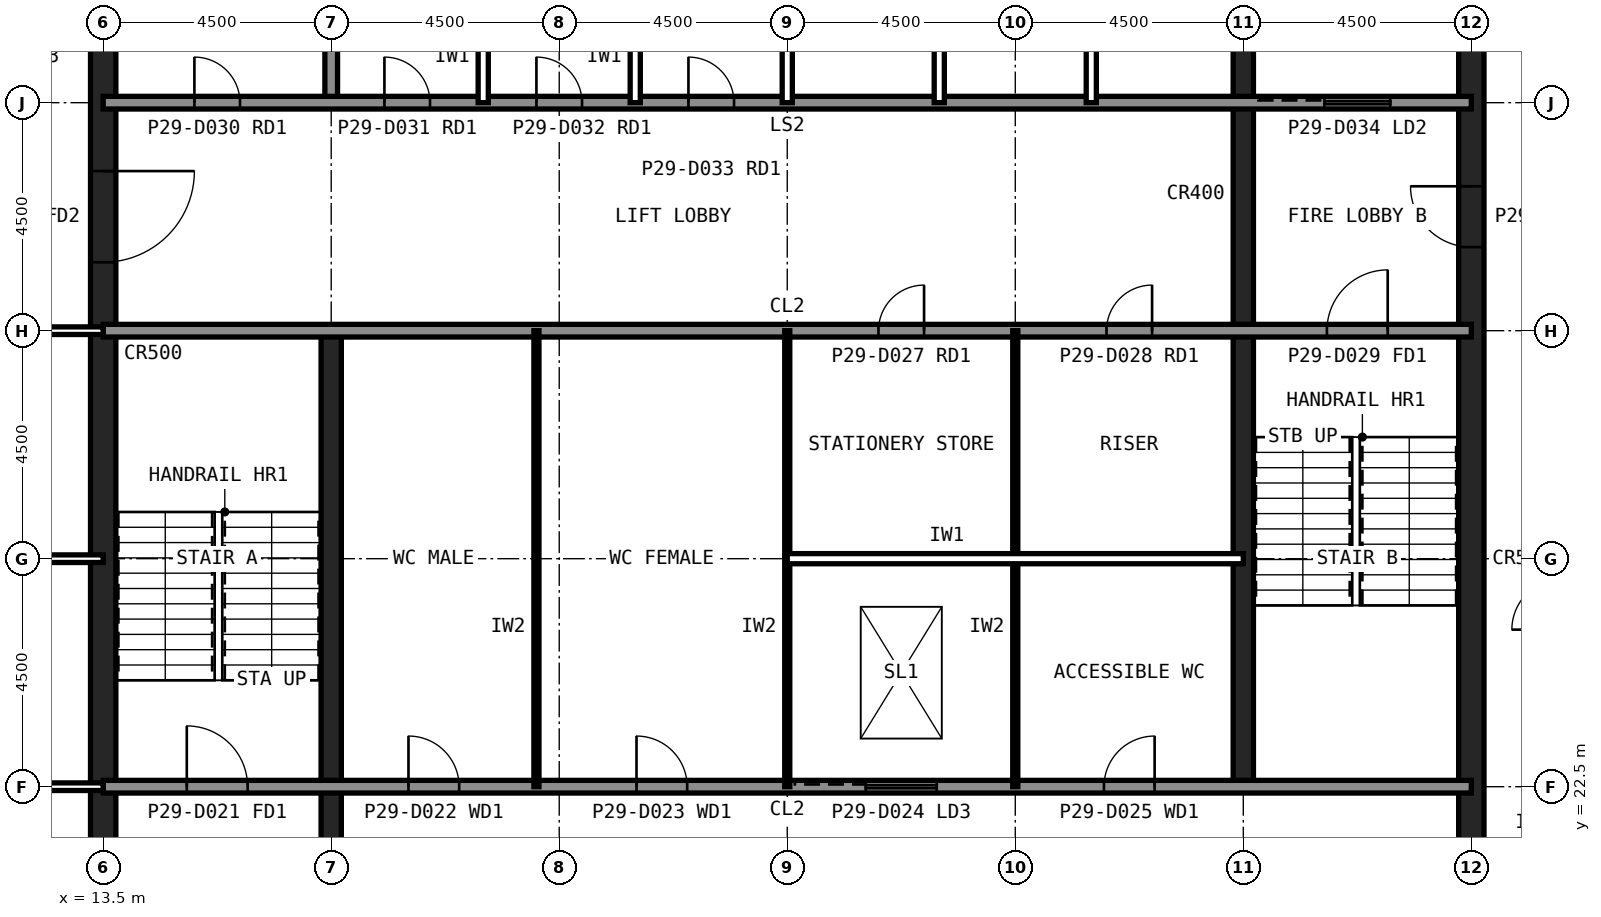
"""IFC4 building model, lengths in metres.
Left out: names, types, materials, properties, quantities, classifications, styles, units other than length and angle.
Written with IfcOpenShell. Run it as: python <this file> out.ifc"""

import sys

from ifc_helpers import new_model, si_unit, direction, frame, frame_2d, origin, place, context, subcontext, project, spatial, rectangle, extrude, element, fill, save


model = new_model("IFC4")
c1 = context("Model", 3, precision=1e-05, world=origin(), true_north=direction((0.0, 1.0)))
c2 = subcontext(c1, "Body", "Model", "MODEL_VIEW")
j1 = project(units=[si_unit("LENGTHUNIT", "METRE"), si_unit("PLANEANGLEUNIT", "RADIAN")], contexts=[c1])
p1 = place(None, origin())
s1 = spatial("IfcSite", under=j1, at=p1, CompositionType="ELEMENT")
p2 = place(p1, origin())
s2 = spatial("IfcBuilding", under=s1, at=p2, CompositionType="ELEMENT")
p3 = place(p2, frame((0.0, 0.0, 127.6)))
s3 = spatial("IfcBuildingStorey", under=s2, at=p3, CompositionType="ELEMENT", Elevation=127.6)
p4 = place(p3, frame((40.5, 13.5, 0.0), z_axis=(0.0, 0.0, 1.0), x_axis=(0.0, 1.0, 0.0)))
e1 = element("IfcWall", 1, at=p4, inside=s3, PredefinedType="SHEAR", context=c2, shape_type="SweptSolid", body=[
    extrude(rectangle(XDim=27.0, YDim=0.5, at=frame_2d((13.5, 0.0))), origin(), (0.0, 0.0, 1.0), 4.0),
])
p5 = place(p4, frame((5.85, 0.0, 0.0)))
e2 = element("IfcOpeningElement", 2, at=p5, cuts=e1, PredefinedType="OPENING", context=c2, shape_type="SweptSolid", body=[
    extrude(rectangle(XDim=1.8, YDim=2.1, at=frame_2d((0.9, 1.05))), frame((0.0, 0.26, 0.0), z_axis=(0.0, -1.0, 0.0), x_axis=(1.0, 0.0, 0.0)), (0.0, 0.0, 1.0), 0.52),
])
p6 = place(p4, frame((19.65, 0.0, 0.0)))
e3 = element("IfcOpeningElement", 3, at=p6, cuts=e1, PredefinedType="OPENING", context=c2, shape_type="SweptSolid", body=[
    extrude(rectangle(XDim=1.2, YDim=2.1, at=frame_2d((0.6, 1.05))), frame((0.0, 0.26, 0.0), z_axis=(0.0, -1.0, 0.0), x_axis=(1.0, 0.0, 0.0)), (0.0, 0.0, 1.0), 0.52),
])
p7 = place(p3, frame((13.5, 40.5, 0.0), z_axis=(0.0, 0.0, 1.0), x_axis=(0.0, -1.0, 0.0)))
e4 = element("IfcWall", 4, at=p7, inside=s3, PredefinedType="SHEAR", context=c2, shape_type="SweptSolid", body=[
    extrude(rectangle(XDim=27.0, YDim=0.5, at=frame_2d((13.5, 0.0))), origin(), (0.0, 0.0, 1.0), 4.0),
])
p8 = place(p7, frame((19.65, 0.0, 0.0)))
e5 = element("IfcOpeningElement", 5, at=p8, cuts=e4, PredefinedType="OPENING", context=c2, shape_type="SweptSolid", body=[
    extrude(rectangle(XDim=1.2, YDim=2.1, at=frame_2d((0.6, 1.05))), frame((0.0, 0.26, 0.0), z_axis=(0.0, -1.0, 0.0), x_axis=(1.0, 0.0, 0.0)), (0.0, 0.0, 1.0), 0.52),
])
p9 = place(p7, frame((5.85, 0.0, 0.0)))
e6 = element("IfcOpeningElement", 6, at=p9, cuts=e4, PredefinedType="OPENING", context=c2, shape_type="SweptSolid", body=[
    extrude(rectangle(XDim=1.8, YDim=2.1, at=frame_2d((0.9, 1.05))), frame((0.0, 0.26, 0.0), z_axis=(0.0, -1.0, 0.0), x_axis=(1.0, 0.0, 0.0)), (0.0, 0.0, 1.0), 0.52),
])
p10 = place(p3, frame((18.0, 13.5, 0.0), z_axis=(0.0, 0.0, 1.0), x_axis=(0.0, 1.0, 0.0)))
e7 = element("IfcWall", 7, at=p10, inside=s3, PredefinedType="SHEAR", context=c2, shape_type="SweptSolid", body=[
    extrude(rectangle(XDim=18.0, YDim=0.4, at=frame_2d((9.0, 0.0))), origin(), (0.0, 0.0, 1.0), 4.0),
])
p11 = place(p3, frame((18.0, 36.0, 0.0), z_axis=(0.0, 0.0, 1.0), x_axis=(0.0, 1.0, 0.0)))
e8 = element("IfcWall", 8, at=p11, inside=s3, PredefinedType="SOLIDWALL", context=c2, shape_type="SweptSolid", body=[
    extrude(rectangle(XDim=4.5, YDim=0.25, at=frame_2d((2.25, 0.0))), origin(), (0.0, 0.0, 1.0), 3.84),
])
p12 = place(p3, frame((36.0, 22.5, 0.0), z_axis=(0.0, 0.0, 1.0), x_axis=(0.0, 1.0, 0.0)))
e9 = element("IfcWall", 9, at=p12, inside=s3, PredefinedType="SHEAR", context=c2, shape_type="SweptSolid", body=[
    extrude(rectangle(XDim=18.0, YDim=0.4, at=frame_2d((9.0, 0.0))), origin(), (0.0, 0.0, 1.0), 4.0),
])
p13 = place(p3, frame((13.5, 36.0, 0.0), z_axis=(0.0, 0.0, 1.0), x_axis=(1.0, 0.0, 0.0)))
e10 = element("IfcWall", 10, at=p13, inside=s3, PredefinedType="SOLIDWALL", context=c2, shape_type="SweptSolid", body=[
    extrude(rectangle(XDim=27.0, YDim=0.25, at=frame_2d((13.5, 0.0))), origin(), (0.0, 0.0, 1.0), 3.84),
])
p14 = place(p13, frame((1.8, 0.0, 0.0)))
e11 = element("IfcOpeningElement", 11, at=p14, cuts=e10, PredefinedType="OPENING", context=c2, shape_type="SweptSolid", body=[
    extrude(rectangle(XDim=0.9, YDim=2.1, at=frame_2d((0.45, 1.05))), frame((0.0, 0.135, 0.0), z_axis=(0.0, -1.0, 0.0), x_axis=(1.0, 0.0, 0.0)), (0.0, 0.0, 1.0), 0.27),
])
p15 = place(p13, frame((5.55, 0.0, 0.0)))
e12 = element("IfcOpeningElement", 12, at=p15, cuts=e10, PredefinedType="OPENING", context=c2, shape_type="SweptSolid", body=[
    extrude(rectangle(XDim=0.9, YDim=2.1, at=frame_2d((0.45, 1.05))), frame((0.0, 0.135, 0.0), z_axis=(0.0, -1.0, 0.0), x_axis=(1.0, 0.0, 0.0)), (0.0, 0.0, 1.0), 0.27),
])
p16 = place(p13, frame((8.55, 0.0, 0.0)))
e13 = element("IfcOpeningElement", 13, at=p16, cuts=e10, PredefinedType="OPENING", context=c2, shape_type="SweptSolid", body=[
    extrude(rectangle(XDim=0.9, YDim=2.1, at=frame_2d((0.45, 1.05))), frame((0.0, 0.135, 0.0), z_axis=(0.0, -1.0, 0.0), x_axis=(1.0, 0.0, 0.0)), (0.0, 0.0, 1.0), 0.27),
])
p17 = place(p13, frame((11.55, 0.0, 0.0)))
e14 = element("IfcOpeningElement", 14, at=p17, cuts=e10, PredefinedType="OPENING", context=c2, shape_type="SweptSolid", body=[
    extrude(rectangle(XDim=0.9, YDim=2.1, at=frame_2d((0.45, 1.05))), frame((0.0, 0.135, 0.0), z_axis=(0.0, -1.0, 0.0), x_axis=(1.0, 0.0, 0.0)), (0.0, 0.0, 1.0), 0.27),
])
p18 = place(p13, frame((24.1, 0.0, 0.0)))
e15 = element("IfcOpeningElement", 15, at=p18, cuts=e10, PredefinedType="OPENING", context=c2, shape_type="SweptSolid", body=[
    extrude(rectangle(XDim=1.3, YDim=2.2, at=frame_2d((0.65, 1.1))), frame((0.0, 0.135, 0.0), z_axis=(0.0, -1.0, 0.0), x_axis=(1.0, 0.0, 0.0)), (0.0, 0.0, 1.0), 0.27),
])
p19 = place(p3, frame((13.5, 22.5, 0.0), z_axis=(0.0, 0.0, 1.0), x_axis=(1.0, 0.0, 0.0)))
e16 = element("IfcWall", 16, at=p19, inside=s3, PredefinedType="SOLIDWALL", context=c2, shape_type="SweptSolid", body=[
    extrude(rectangle(XDim=27.0, YDim=0.25, at=frame_2d((13.5, 0.0))), origin(), (0.0, 0.0, 1.0), 3.84),
])
p20 = place(p19, frame((1.65, 0.0, 0.0)))
e17 = element("IfcOpeningElement", 17, at=p20, cuts=e16, PredefinedType="OPENING", context=c2, shape_type="SweptSolid", body=[
    extrude(rectangle(XDim=1.2, YDim=2.1, at=frame_2d((0.6, 1.05))), frame((0.0, 0.135, 0.0), z_axis=(0.0, -1.0, 0.0), x_axis=(1.0, 0.0, 0.0)), (0.0, 0.0, 1.0), 0.27),
])
p21 = place(p19, frame((6.025, 0.0, 0.0)))
e18 = element("IfcOpeningElement", 18, at=p21, cuts=e16, PredefinedType="OPENING", context=c2, shape_type="SweptSolid", body=[
    extrude(rectangle(XDim=1.0, YDim=2.1, at=frame_2d((0.5, 1.05))), frame((0.0, 0.135, 0.0), z_axis=(0.0, -1.0, 0.0), x_axis=(1.0, 0.0, 0.0)), (0.0, 0.0, 1.0), 0.27),
])
p22 = place(p19, frame((10.525, 0.0, 0.0)))
e19 = element("IfcOpeningElement", 19, at=p22, cuts=e16, PredefinedType="OPENING", context=c2, shape_type="SweptSolid", body=[
    extrude(rectangle(XDim=1.0, YDim=2.1, at=frame_2d((0.5, 1.05))), frame((0.0, 0.135, 0.0), z_axis=(0.0, -1.0, 0.0), x_axis=(1.0, 0.0, 0.0)), (0.0, 0.0, 1.0), 0.27),
])
p23 = place(p19, frame((19.75, 0.0, 0.0)))
e20 = element("IfcOpeningElement", 20, at=p23, cuts=e16, PredefinedType="OPENING", context=c2, shape_type="SweptSolid", body=[
    extrude(rectangle(XDim=1.0, YDim=2.1, at=frame_2d((0.5, 1.05))), frame((0.0, 0.135, 0.0), z_axis=(0.0, -1.0, 0.0), x_axis=(1.0, 0.0, 0.0)), (0.0, 0.0, 1.0), 0.27),
])
p24 = place(p19, frame((15.05, 0.0, 0.0)))
e21 = element("IfcOpeningElement", 21, at=p24, cuts=e16, PredefinedType="OPENING", context=c2, shape_type="SweptSolid", body=[
    extrude(rectangle(XDim=1.4, YDim=2.4, at=frame_2d((0.7, 1.2))), frame((0.0, 0.135, 0.0), z_axis=(0.0, -1.0, 0.0), x_axis=(1.0, 0.0, 0.0)), (0.0, 0.0, 1.0), 0.27),
])
p25 = place(p3, frame((13.5, 31.5, 0.0), z_axis=(0.0, 0.0, 1.0), x_axis=(1.0, 0.0, 0.0)))
e22 = element("IfcWall", 22, at=p25, inside=s3, PredefinedType="SOLIDWALL", context=c2, shape_type="SweptSolid", body=[
    extrude(rectangle(XDim=27.0, YDim=0.25, at=frame_2d((13.5, 0.0))), origin(), (0.0, 0.0, 1.0), 3.84),
])
p26 = place(p25, frame((24.15, 0.0, 0.0)))
e23 = element("IfcOpeningElement", 23, at=p26, cuts=e22, PredefinedType="OPENING", context=c2, shape_type="SweptSolid", body=[
    extrude(rectangle(XDim=1.2, YDim=2.1, at=frame_2d((0.6, 1.05))), frame((0.0, 0.135, 0.0), z_axis=(0.0, -1.0, 0.0), x_axis=(1.0, 0.0, 0.0)), (0.0, 0.0, 1.0), 0.27),
])
p27 = place(p25, frame((15.3, 0.0, 0.0)))
e24 = element("IfcOpeningElement", 24, at=p27, cuts=e22, PredefinedType="OPENING", context=c2, shape_type="SweptSolid", body=[
    extrude(rectangle(XDim=0.9, YDim=2.1, at=frame_2d((0.45, 1.05))), frame((0.0, 0.135, 0.0), z_axis=(0.0, -1.0, 0.0), x_axis=(1.0, 0.0, 0.0)), (0.0, 0.0, 1.0), 0.27),
])
p28 = place(p25, frame((19.8, 0.0, 0.0)))
e25 = element("IfcOpeningElement", 25, at=p28, cuts=e22, PredefinedType="OPENING", context=c2, shape_type="SweptSolid", body=[
    extrude(rectangle(XDim=0.9, YDim=2.1, at=frame_2d((0.45, 1.05))), frame((0.0, 0.135, 0.0), z_axis=(0.0, -1.0, 0.0), x_axis=(1.0, 0.0, 0.0)), (0.0, 0.0, 1.0), 0.27),
])
for number, where, z_axis, x_axis in (
    (26, (21.0, 36.0, 0.0), (0.0, 0.0, 1.0), (0.0, 1.0, 0.0)),
    (27, (24.0, 36.0, 0.0), (0.0, 0.0, 1.0), (0.0, 1.0, 0.0)),
    (28, (27.0, 36.0, 0.0), (0.0, 0.0, 1.0), (0.0, 1.0, 0.0)),
    (29, (30.0, 36.0, 0.0), (0.0, 0.0, 1.0), (0.0, 1.0, 0.0)),
    (30, (33.0, 36.0, 0.0), (0.0, 0.0, 1.0), (0.0, 1.0, 0.0)),
):
    element("IfcWall", number, at=place(p3, frame(where, z_axis=z_axis, x_axis=x_axis)), inside=s3, PredefinedType="PARTITIONING", context=c2, shape_type="SweptSolid", body=[
        extrude(rectangle(XDim=4.5, YDim=0.2, at=frame_2d((2.25, 0.0))), origin(), (0.0, 0.0, 1.0), 3.84),
    ])
for number, where, z_axis, x_axis in (
    (31, (22.05, 22.5, 0.0), (0.0, 0.0, 1.0), (0.0, 1.0, 0.0)),
    (32, (27.0, 22.5, 0.0), (0.0, 0.0, 1.0), (0.0, 1.0, 0.0)),
    (33, (31.5, 22.5, 0.0), (0.0, 0.0, 1.0), (0.0, 1.0, 0.0)),
):
    element("IfcWall", number, at=place(p3, frame(where, z_axis=z_axis, x_axis=x_axis)), inside=s3, PredefinedType="PLUMBINGWALL", context=c2, shape_type="SweptSolid", body=[
        extrude(rectangle(XDim=9.0, YDim=0.1, at=frame_2d((4.5, 0.0))), origin(), (0.0, 0.0, 1.0), 3.84),
    ])
p29 = place(p3, frame((27.0, 27.0, 0.0), z_axis=(0.0, 0.0, 1.0), x_axis=(1.0, 0.0, 0.0)))
e34 = element("IfcWall", 34, at=p29, inside=s3, PredefinedType="PARTITIONING", context=c2, shape_type="SweptSolid", body=[
    extrude(rectangle(XDim=9.0, YDim=0.2, at=frame_2d((4.5, 0.0))), origin(), (0.0, 0.0, 1.0), 3.84),
])
p30 = place(p3, frame((6.75, 22.5, 0.0), z_axis=(0.0, 0.0, 1.0), x_axis=(1.0, 0.0, 0.0)))
e35 = element("IfcWall", 35, at=p30, inside=s3, PredefinedType="PARTITIONING", context=c2, shape_type="SweptSolid", body=[
    extrude(rectangle(XDim=6.75, YDim=0.15, at=frame_2d((3.375, 0.0))), origin(), (0.0, 0.0, 1.0), 2.989),
])
p31 = place(p30, frame((2.875, 0.0, 0.0)))
e36 = element("IfcOpeningElement", 36, at=p31, cuts=e35, PredefinedType="OPENING", context=c2, shape_type="SweptSolid", body=[
    extrude(rectangle(XDim=1.0, YDim=2.1, at=frame_2d((0.5, 1.05))), frame((0.0, 0.085, 0.0), z_axis=(0.0, -1.0, 0.0), x_axis=(1.0, 0.0, 0.0)), (0.0, 0.0, 1.0), 0.17),
])
p32 = place(p3, frame((13.5, 27.0, 0.0), z_axis=(0.0, 0.0, 1.0), x_axis=(-1.0, 0.0, 0.0)))
e37 = element("IfcWall", 37, at=p32, inside=s3, PredefinedType="PARTITIONING", context=c2, shape_type="SweptSolid", body=[
    extrude(rectangle(XDim=6.75, YDim=0.15, at=frame_2d((3.375, 0.0))), origin(), (0.0, 0.0, 1.0), 2.989),
])
p33 = place(p3, frame((13.5, 31.5, 0.0), z_axis=(0.0, 0.0, 1.0), x_axis=(-1.0, 0.0, 0.0)))
e38 = element("IfcWall", 38, at=p33, inside=s3, PredefinedType="PARTITIONING", context=c2, shape_type="SweptSolid", body=[
    extrude(rectangle(XDim=6.75, YDim=0.15, at=frame_2d((3.375, 0.0))), origin(), (0.0, 0.0, 1.0), 2.989),
])
p34 = place(p33, frame((2.875, 0.0, 0.0)))
e39 = element("IfcOpeningElement", 39, at=p34, cuts=e38, PredefinedType="OPENING", context=c2, shape_type="SweptSolid", body=[
    extrude(rectangle(XDim=1.0, YDim=2.1, at=frame_2d((0.5, 1.05))), frame((0.0, 0.085, 0.0), z_axis=(0.0, -1.0, 0.0), x_axis=(1.0, 0.0, 0.0)), (0.0, 0.0, 1.0), 0.17),
])
p35 = place(p9, origin())
e40 = element("IfcDoor", 40, at=p35, inside=s3, OperationType="SINGLE_SWING_LEFT", PredefinedType="DOOR", context=c2, shape_type="SweptSolid", body=[
    extrude(rectangle(XDim=1.8, YDim=2.1, at=frame_2d((0.9, 1.05))), frame((0.0, 0.025, 0.0), z_axis=(0.0, -1.0, 0.0), x_axis=(1.0, 0.0, 0.0)), (0.0, 0.0, 1.0), 0.05),
])
fill(e6, e40)
p36 = place(p6, origin())
e41 = element("IfcDoor", 41, at=p36, inside=s3, OperationType="SINGLE_SWING_RIGHT", PredefinedType="DOOR", context=c2, shape_type="SweptSolid", body=[
    extrude(rectangle(XDim=1.2, YDim=2.1, at=frame_2d((0.6, 1.05))), frame((0.0, 0.025, 0.0), z_axis=(0.0, -1.0, 0.0), x_axis=(1.0, 0.0, 0.0)), (0.0, 0.0, 1.0), 0.05),
])
fill(e3, e41)
p37 = place(p20, origin())
e42 = element("IfcDoor", 42, at=p37, inside=s3, OperationType="SINGLE_SWING_LEFT", PredefinedType="DOOR", context=c2, shape_type="SweptSolid", body=[
    extrude(rectangle(XDim=1.2, YDim=2.1, at=frame_2d((0.6, 1.05))), frame((0.0, 0.025, 0.0), z_axis=(0.0, -1.0, 0.0), x_axis=(1.0, 0.0, 0.0)), (0.0, 0.0, 1.0), 0.05),
])
fill(e17, e42)
p38 = place(p26, origin())
e43 = element("IfcDoor", 43, at=p38, inside=s3, OperationType="SINGLE_SWING_RIGHT", PredefinedType="DOOR", context=c2, shape_type="SweptSolid", body=[
    extrude(rectangle(XDim=1.2, YDim=2.1, at=frame_2d((0.6, 1.05))), frame((0.0, 0.025, 0.0), z_axis=(0.0, -1.0, 0.0), x_axis=(1.0, 0.0, 0.0)), (0.0, 0.0, 1.0), 0.05),
])
fill(e23, e43)
p39 = place(p21, origin())
e44 = element("IfcDoor", 44, at=p39, inside=s3, OperationType="SINGLE_SWING_LEFT", PredefinedType="DOOR", context=c2, shape_type="SweptSolid", body=[
    extrude(rectangle(XDim=1.0, YDim=2.1, at=frame_2d((0.5, 1.05))), frame((0.0, 0.025, 0.0), z_axis=(0.0, -1.0, 0.0), x_axis=(1.0, 0.0, 0.0)), (0.0, 0.0, 1.0), 0.05),
])
fill(e18, e44)
p40 = place(p22, origin())
e45 = element("IfcDoor", 45, at=p40, inside=s3, OperationType="SINGLE_SWING_LEFT", PredefinedType="DOOR", context=c2, shape_type="SweptSolid", body=[
    extrude(rectangle(XDim=1.0, YDim=2.1, at=frame_2d((0.5, 1.05))), frame((0.0, 0.025, 0.0), z_axis=(0.0, -1.0, 0.0), x_axis=(1.0, 0.0, 0.0)), (0.0, 0.0, 1.0), 0.05),
])
fill(e19, e45)
p41 = place(p23, origin())
e46 = element("IfcDoor", 46, at=p41, inside=s3, OperationType="SINGLE_SWING_RIGHT", PredefinedType="DOOR", context=c2, shape_type="SweptSolid", body=[
    extrude(rectangle(XDim=1.0, YDim=2.1, at=frame_2d((0.5, 1.05))), frame((0.0, 0.025, 0.0), z_axis=(0.0, -1.0, 0.0), x_axis=(1.0, 0.0, 0.0)), (0.0, 0.0, 1.0), 0.05),
])
fill(e20, e46)
p42 = place(p27, origin())
e47 = element("IfcDoor", 47, at=p42, inside=s3, OperationType="SINGLE_SWING_RIGHT", PredefinedType="DOOR", context=c2, shape_type="SweptSolid", body=[
    extrude(rectangle(XDim=0.9, YDim=2.1, at=frame_2d((0.45, 1.05))), frame((0.0, 0.025, 0.0), z_axis=(0.0, -1.0, 0.0), x_axis=(1.0, 0.0, 0.0)), (0.0, 0.0, 1.0), 0.05),
])
fill(e24, e47)
p43 = place(p28, origin())
e48 = element("IfcDoor", 48, at=p43, inside=s3, OperationType="SINGLE_SWING_RIGHT", PredefinedType="DOOR", context=c2, shape_type="SweptSolid", body=[
    extrude(rectangle(XDim=0.9, YDim=2.1, at=frame_2d((0.45, 1.05))), frame((0.0, 0.025, 0.0), z_axis=(0.0, -1.0, 0.0), x_axis=(1.0, 0.0, 0.0)), (0.0, 0.0, 1.0), 0.05),
])
fill(e25, e48)
p44 = place(p14, origin())
e49 = element("IfcDoor", 49, at=p44, inside=s3, OperationType="SINGLE_SWING_LEFT", PredefinedType="DOOR", context=c2, shape_type="SweptSolid", body=[
    extrude(rectangle(XDim=0.9, YDim=2.1, at=frame_2d((0.45, 1.05))), frame((0.0, 0.025, 0.0), z_axis=(0.0, -1.0, 0.0), x_axis=(1.0, 0.0, 0.0)), (0.0, 0.0, 1.0), 0.05),
])
fill(e11, e49)
p45 = place(p15, origin())
e50 = element("IfcDoor", 50, at=p45, inside=s3, OperationType="SINGLE_SWING_LEFT", PredefinedType="DOOR", context=c2, shape_type="SweptSolid", body=[
    extrude(rectangle(XDim=0.9, YDim=2.1, at=frame_2d((0.45, 1.05))), frame((0.0, 0.025, 0.0), z_axis=(0.0, -1.0, 0.0), x_axis=(1.0, 0.0, 0.0)), (0.0, 0.0, 1.0), 0.05),
])
fill(e12, e50)
p46 = place(p16, origin())
e51 = element("IfcDoor", 51, at=p46, inside=s3, OperationType="SINGLE_SWING_LEFT", PredefinedType="DOOR", context=c2, shape_type="SweptSolid", body=[
    extrude(rectangle(XDim=0.9, YDim=2.1, at=frame_2d((0.45, 1.05))), frame((0.0, 0.025, 0.0), z_axis=(0.0, -1.0, 0.0), x_axis=(1.0, 0.0, 0.0)), (0.0, 0.0, 1.0), 0.05),
])
fill(e13, e51)
p47 = place(p17, origin())
e52 = element("IfcDoor", 52, at=p47, inside=s3, OperationType="SINGLE_SWING_LEFT", PredefinedType="DOOR", context=c2, shape_type="SweptSolid", body=[
    extrude(rectangle(XDim=0.9, YDim=2.1, at=frame_2d((0.45, 1.05))), frame((0.0, 0.025, 0.0), z_axis=(0.0, -1.0, 0.0), x_axis=(1.0, 0.0, 0.0)), (0.0, 0.0, 1.0), 0.05),
])
fill(e14, e52)
p48 = place(p18, origin())
e53 = element("IfcDoor", 53, at=p48, inside=s3, OperationType="SLIDING_TO_LEFT", PredefinedType="DOOR", context=c2, shape_type="SweptSolid", body=[
    extrude(rectangle(XDim=1.3, YDim=2.2, at=frame_2d((0.65, 1.1))), frame((0.0, 0.025, 0.0), z_axis=(0.0, -1.0, 0.0), x_axis=(1.0, 0.0, 0.0)), (0.0, 0.0, 1.0), 0.05),
])
fill(e15, e53)
p49 = place(p24, origin())
e54 = element("IfcDoor", 54, at=p49, inside=s3, OperationType="SLIDING_TO_LEFT", PredefinedType="DOOR", context=c2, shape_type="SweptSolid", body=[
    extrude(rectangle(XDim=1.4, YDim=2.4, at=frame_2d((0.7, 1.2))), frame((0.0, 0.025, 0.0), z_axis=(0.0, -1.0, 0.0), x_axis=(1.0, 0.0, 0.0)), (0.0, 0.0, 1.0), 0.05),
])
fill(e21, e54)
save(model, sys.argv[1])
